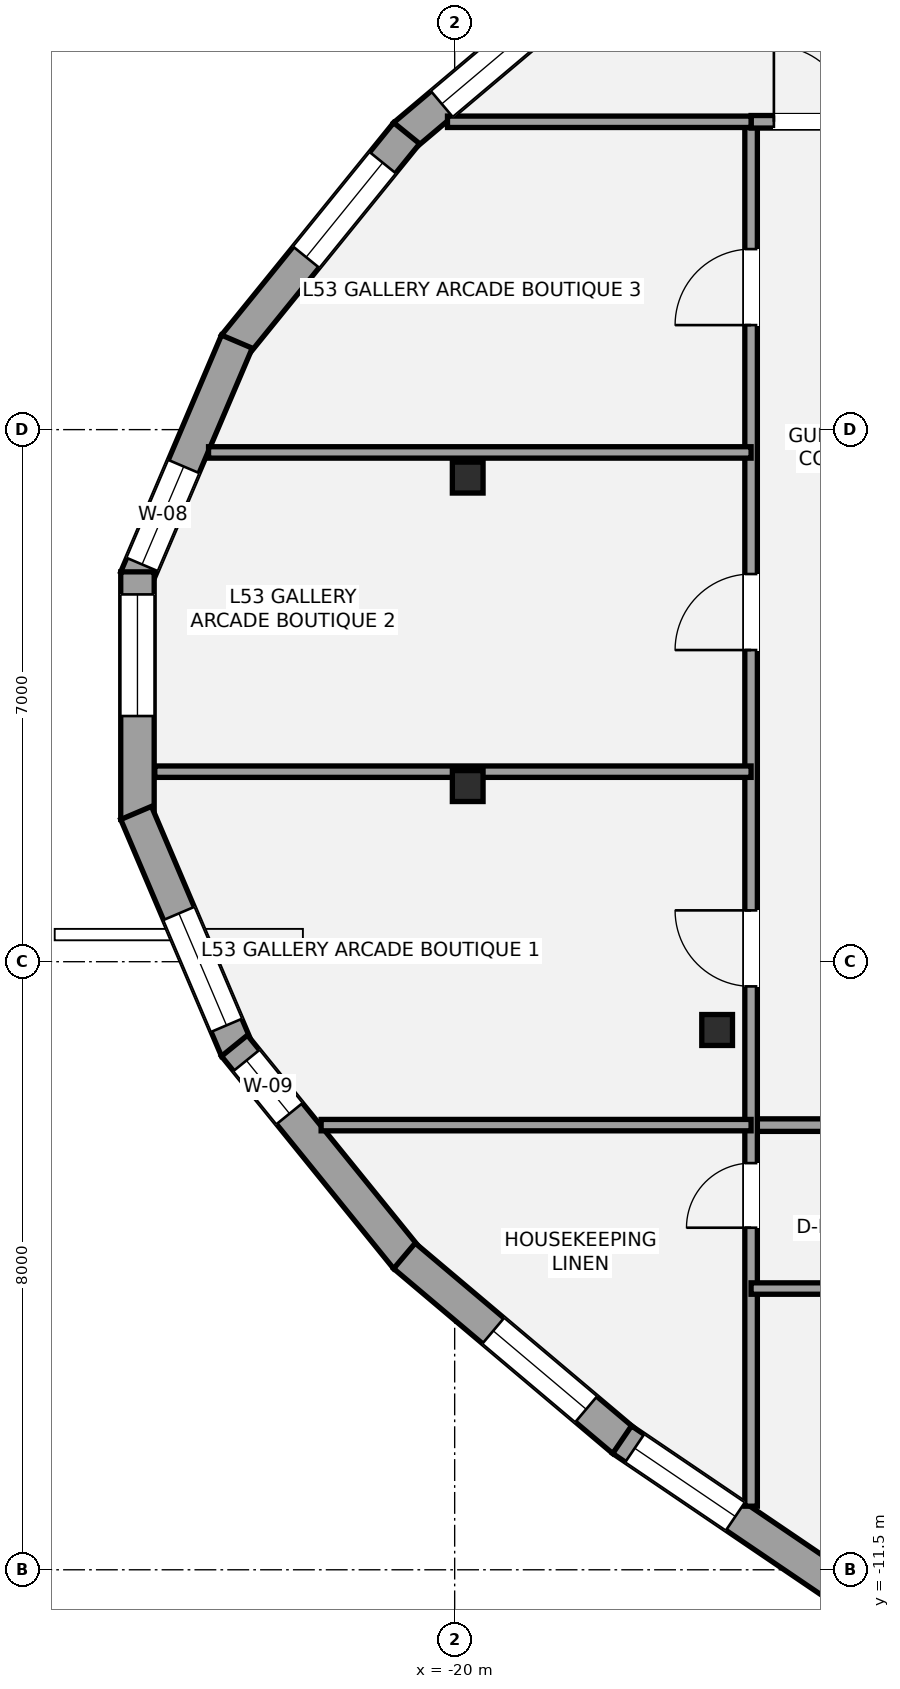
"""IFC4 building model, lengths in metres.
Left out: names, types, materials, properties, quantities, classifications, styles, units other than length and angle.
Written with IfcOpenShell. Run it as: python <this file> out.ifc"""

import sys

from ifc_helpers import new_model, si_unit, direction, frame, frame_2d, origin, origin_2d, place, context, subcontext, project, spatial, rectangle, i_section, extrude, element, fill, save


model = new_model("IFC4")
c1 = context("Model", 3, precision=1e-05, world=origin(), true_north=direction((0.0, 1.0)))
c2 = subcontext(c1, "Body", "Model", "MODEL_VIEW")
j1 = project(units=[si_unit("LENGTHUNIT", "METRE"), si_unit("PLANEANGLEUNIT", "RADIAN")], contexts=[c1])
p1 = place(None, origin())
s1 = spatial("IfcSite", under=j1, at=p1, CompositionType="ELEMENT")
p2 = place(p1, origin())
s2 = spatial("IfcBuilding", under=s1, at=p2, CompositionType="ELEMENT")
p3 = place(p2, frame((0.0, 0.0, 191.8)))
s3 = spatial("IfcBuildingStorey", under=s2, at=p3, CompositionType="ELEMENT", Elevation=191.8)
for number, where, z_axis, x_axis in (
    (1, (-19.828, 2.869, 0.0), (0.0, 0.0, 1.0), (1.0, 0.0, 0.0)),
    (2, (-19.828, -1.189, 0.0), (0.0, 0.0, 1.0), (1.0, 0.0, 0.0)),
    (3, (-16.547, -4.398, 0.0), (0.0, 0.0, 1.0), (1.0, 0.0, 0.0)),
):
    element("IfcColumn", number, at=place(p3, frame(where, z_axis=z_axis, x_axis=x_axis)), inside=s3, PredefinedType="COLUMN", context=c2, shape_type="SweptSolid", body=[
        extrude(i_section(OverallWidth=0.404, OverallDepth=0.407, WebThickness=0.027, FlangeThickness=0.044, at=origin_2d()), origin(), (0.0, 0.0, 1.0), 3.2),
    ])
p4 = place(p3, frame((-20.661, 7.37, 0.0), z_axis=(0.0, 0.0, 1.0), x_axis=(0.764269547527, 0.644896936512, 0.0)))
e4 = element("IfcWall", 4, at=p4, inside=s3, PredefinedType="STANDARD", context=c2, shape_type="SweptSolid", body=[
    extrude(rectangle(XDim=3.771, YDim=0.44, at=frame_2d((1.886, 0.0))), origin(), (0.0, 0.0, 1.0), 2.315),
])
p5 = place(p4, frame((0.643, 0.0, 0.58)))
e5 = element("IfcOpeningElement", 5, at=p5, cuts=e4, PredefinedType="OPENING", context=c2, shape_type="SweptSolid", body=[
    extrude(rectangle(XDim=1.6, YDim=1.55, at=frame_2d((0.8, 0.775))), frame((0.0, 0.23, 0.0), z_axis=(0.0, -1.0, 0.0), x_axis=(1.0, 0.0, 0.0)), (0.0, 0.0, 1.0), 0.46),
])
p6 = place(p3, frame((-22.897, 4.605, 0.0), z_axis=(0.0, 0.0, 1.0), x_axis=(0.629697919329, 0.776840093193, 0.0)))
e6 = element("IfcWall", 6, at=p6, inside=s3, PredefinedType="STANDARD", context=c2, shape_type="SweptSolid", body=[
    extrude(rectangle(XDim=3.597, YDim=0.44, at=frame_2d((1.799, 0.0))), origin(), (0.0, 0.0, 1.0), 2.315),
])
p7 = place(p6, frame((1.498, 0.0, 0.58)))
e7 = element("IfcOpeningElement", 7, at=p7, cuts=e6, PredefinedType="OPENING", context=c2, shape_type="SweptSolid", body=[
    extrude(rectangle(XDim=1.6, YDim=1.55, at=frame_2d((0.8, 0.775))), frame((0.0, 0.23, 0.0), z_axis=(0.0, -1.0, 0.0), x_axis=(1.0, 0.0, 0.0)), (0.0, 0.0, 1.0), 0.46),
])
p8 = place(p3, frame((-24.191, 1.543, 0.0), z_axis=(0.0, 0.0, 1.0), x_axis=(0.391568154721, 0.920149107595, 0.0)))
e8 = element("IfcWall", 8, at=p8, inside=s3, PredefinedType="STANDARD", context=c2, shape_type="SweptSolid", body=[
    extrude(rectangle(XDim=3.385, YDim=0.44, at=frame_2d((1.693, 0.0))), origin(), (0.0, 0.0, 1.0), 2.315),
])
p9 = place(p8, frame((0.2, 0.0, 0.58)))
e9 = element("IfcOpeningElement", 9, at=p9, cuts=e8, PredefinedType="OPENING", context=c2, shape_type="SweptSolid", body=[
    extrude(rectangle(XDim=1.4, YDim=1.55, at=frame_2d((0.7, 0.775))), frame((0.0, 0.23, 0.0), z_axis=(0.0, -1.0, 0.0), x_axis=(1.0, 0.0, 0.0)), (0.0, 0.0, 1.0), 0.46),
])
p10 = place(p3, frame((-24.174, -1.629, 0.0), z_axis=(0.0, 0.0, 1.0), x_axis=(0.0, 1.0, 0.0)))
e10 = element("IfcWall", 10, at=p10, inside=s3, PredefinedType="STANDARD", context=c2, shape_type="SweptSolid", body=[
    extrude(rectangle(XDim=3.258, YDim=0.44, at=frame_2d((1.629, 0.0))), origin(), (0.0, 0.0, 1.0), 2.315),
])
p11 = place(p10, frame((1.361, 0.0, 0.58)))
e11 = element("IfcOpeningElement", 11, at=p11, cuts=e10, PredefinedType="OPENING", context=c2, shape_type="SweptSolid", body=[
    extrude(rectangle(XDim=1.6, YDim=1.55, at=frame_2d((0.8, 0.775))), frame((0.0, 0.23, 0.0), z_axis=(0.0, -1.0, 0.0), x_axis=(1.0, 0.0, 0.0)), (0.0, 0.0, 1.0), 0.46),
])
p12 = place(p3, frame((-22.865, -4.658, 0.0), z_axis=(0.0, 0.0, 1.0), x_axis=(-0.391568154721, 0.920149107595, 0.0)))
e12 = element("IfcWall", 12, at=p12, inside=s3, PredefinedType="STANDARD", context=c2, shape_type="SweptSolid", body=[
    extrude(rectangle(XDim=3.385, YDim=0.44, at=frame_2d((1.693, 0.0))), origin(), (0.0, 0.0, 1.0), 2.315),
])
p13 = place(p12, frame((0.348, 0.0, 0.58)))
e13 = element("IfcOpeningElement", 13, at=p13, cuts=e12, PredefinedType="OPENING", context=c2, shape_type="SweptSolid", body=[
    extrude(rectangle(XDim=1.6, YDim=1.55, at=frame_2d((0.8, 0.775))), frame((0.0, 0.23, 0.0), z_axis=(0.0, -1.0, 0.0), x_axis=(1.0, 0.0, 0.0)), (0.0, 0.0, 1.0), 0.46),
])
p14 = place(p3, frame((-20.632, -7.4, 0.0), z_axis=(0.0, 0.0, 1.0), x_axis=(-0.629697919329, 0.776840093193, 0.0)))
e14 = element("IfcWall", 14, at=p14, inside=s3, PredefinedType="STANDARD", context=c2, shape_type="SweptSolid", body=[
    extrude(rectangle(XDim=3.597, YDim=0.44, at=frame_2d((1.799, 0.0))), origin(), (0.0, 0.0, 1.0), 2.315),
])
p15 = place(p14, frame((2.447, 0.0, 0.58)))
e15 = element("IfcOpeningElement", 15, at=p15, cuts=e14, PredefinedType="OPENING", context=c2, shape_type="SweptSolid", body=[
    extrude(rectangle(XDim=0.9, YDim=1.35, at=frame_2d((0.45, 0.675))), frame((0.0, 0.23, 0.0), z_axis=(0.0, -1.0, 0.0), x_axis=(1.0, 0.0, 0.0)), (0.0, 0.0, 1.0), 0.46),
])
p16 = place(p3, frame((-17.779, -9.802, 0.0), z_axis=(0.0, 0.0, 1.0), x_axis=(-0.764269547527, 0.644896936512, 0.0)))
e16 = element("IfcWall", 16, at=p16, inside=s3, PredefinedType="STANDARD", context=c2, shape_type="SweptSolid", body=[
    extrude(rectangle(XDim=3.771, YDim=0.44, at=frame_2d((1.886, 0.0))), origin(), (0.0, 0.0, 1.0), 2.315),
])
p17 = place(p16, frame((0.643, 0.0, 0.58)))
e17 = element("IfcOpeningElement", 17, at=p17, cuts=e16, PredefinedType="OPENING", context=c2, shape_type="SweptSolid", body=[
    extrude(rectangle(XDim=1.6, YDim=1.55, at=frame_2d((0.8, 0.775))), frame((0.0, 0.23, 0.0), z_axis=(0.0, -1.0, 0.0), x_axis=(1.0, 0.0, 0.0)), (0.0, 0.0, 1.0), 0.46),
])
p18 = place(p3, frame((-14.583, -11.967, 0.0), z_axis=(0.0, 0.0, 1.0), x_axis=(-0.827690675663, 0.561184591218, 0.0)))
e18 = element("IfcWall", 18, at=p18, inside=s3, PredefinedType="STANDARD", context=c2, shape_type="SweptSolid", body=[
    extrude(rectangle(XDim=3.882, YDim=0.44, at=frame_2d((1.941, 0.0))), origin(), (0.0, 0.0, 1.0), 2.315),
])
p19 = place(p18, frame((2.083, 0.0, 0.58)))
e19 = element("IfcOpeningElement", 19, at=p19, cuts=e18, PredefinedType="OPENING", context=c2, shape_type="SweptSolid", body=[
    extrude(rectangle(XDim=1.6, YDim=1.55, at=frame_2d((0.8, 0.775))), frame((0.0, 0.23, 0.0), z_axis=(0.0, -1.0, 0.0), x_axis=(1.0, 0.0, 0.0)), (0.0, 0.0, 1.0), 0.46),
])
p20 = place(p3, frame((-16.1, -5.65, 0.0), z_axis=(0.0, 0.0, 1.0), x_axis=(1.0, 0.0, 0.0)))
e20 = element("IfcWall", 20, at=p20, inside=s3, PredefinedType="PARTITIONING", context=c2, shape_type="SweptSolid", body=[
    extrude(rectangle(XDim=31.65, YDim=0.165, at=frame_2d((15.825, 0.0))), origin(), (0.0, 0.0, 1.0), 2.398),
])
p21 = place(p20, frame((8.95, 0.0, 0.0)))
e21 = element("IfcOpeningElement", 21, at=p21, cuts=e20, PredefinedType="OPENING", context=c2, shape_type="SweptSolid", body=[
    extrude(rectangle(XDim=0.95, YDim=2.15, at=frame_2d((0.475, 1.075))), frame((0.0, 0.093, 0.0), z_axis=(0.0, -1.0, 0.0), x_axis=(1.0, 0.0, 0.0)), (0.0, 0.0, 1.0), 0.185),
])
p22 = place(p20, frame((18.95, 0.0, 0.0)))
e22 = element("IfcOpeningElement", 22, at=p22, cuts=e20, PredefinedType="OPENING", context=c2, shape_type="SweptSolid", body=[
    extrude(rectangle(XDim=0.95, YDim=2.15, at=frame_2d((0.475, 1.075))), frame((0.0, 0.093, 0.0), z_axis=(0.0, -1.0, 0.0), x_axis=(1.0, 0.0, 0.0)), (0.0, 0.0, 1.0), 0.185),
])
p23 = place(p20, frame((30.3, 0.0, 0.0)))
e23 = element("IfcOpeningElement", 23, at=p23, cuts=e20, PredefinedType="OPENING", context=c2, shape_type="SweptSolid", body=[
    extrude(rectangle(XDim=0.95, YDim=2.15, at=frame_2d((0.475, 1.075))), frame((0.0, 0.093, 0.0), z_axis=(0.0, -1.0, 0.0), x_axis=(1.0, 0.0, 0.0)), (0.0, 0.0, 1.0), 0.185),
])
p24 = place(p3, frame((-16.1, -10.663, 0.0), z_axis=(0.0, 0.0, 1.0), x_axis=(0.0, 1.0, 0.0)))
e24 = element("IfcWall", 24, at=p24, inside=s3, PredefinedType="PARTITIONING", context=c2, shape_type="SweptSolid", body=[
    extrude(rectangle(XDim=18.213, YDim=0.165, at=frame_2d((9.107, 0.0))), origin(), (0.0, 0.0, 1.0), 2.473),
])
p25 = place(p24, frame((3.664, 0.0, 0.0)))
e25 = element("IfcOpeningElement", 25, at=p25, cuts=e24, PredefinedType="OPENING", context=c2, shape_type="SweptSolid", body=[
    extrude(rectangle(XDim=0.85, YDim=2.1, at=frame_2d((0.425, 1.05))), frame((0.0, 0.093, 0.0), z_axis=(0.0, -1.0, 0.0), x_axis=(1.0, 0.0, 0.0)), (0.0, 0.0, 1.0), 0.185),
])
p26 = place(p24, frame((6.839, 0.0, 0.0)))
e26 = element("IfcOpeningElement", 26, at=p26, cuts=e24, PredefinedType="OPENING", context=c2, shape_type="SweptSolid", body=[
    extrude(rectangle(XDim=1.0, YDim=2.15, at=frame_2d((0.5, 1.075))), frame((0.0, 0.093, 0.0), z_axis=(0.0, -1.0, 0.0), x_axis=(1.0, 0.0, 0.0)), (0.0, 0.0, 1.0), 0.185),
])
p27 = place(p24, frame((11.264, 0.0, 0.0)))
e27 = element("IfcOpeningElement", 27, at=p27, cuts=e24, PredefinedType="OPENING", context=c2, shape_type="SweptSolid", body=[
    extrude(rectangle(XDim=1.0, YDim=2.15, at=frame_2d((0.5, 1.075))), frame((0.0, 0.093, 0.0), z_axis=(0.0, -1.0, 0.0), x_axis=(1.0, 0.0, 0.0)), (0.0, 0.0, 1.0), 0.185),
])
p28 = place(p24, frame((15.539, 0.0, 0.0)))
e28 = element("IfcOpeningElement", 28, at=p28, cuts=e24, PredefinedType="OPENING", context=c2, shape_type="SweptSolid", body=[
    extrude(rectangle(XDim=1.0, YDim=2.15, at=frame_2d((0.5, 1.075))), frame((0.0, 0.093, 0.0), z_axis=(0.0, -1.0, 0.0), x_axis=(1.0, 0.0, 0.0)), (0.0, 0.0, 1.0), 0.185),
])
p29 = place(p3, frame((-16.1, 7.55, 0.0), z_axis=(0.0, 0.0, 1.0), x_axis=(1.0, 0.0, 0.0)))
e29 = element("IfcWall", 29, at=p29, inside=s3, PredefinedType="PARTITIONING", context=c2, shape_type="SweptSolid", body=[
    extrude(rectangle(XDim=2.3, YDim=0.165, at=frame_2d((1.15, 0.0))), origin(), (0.0, 0.0, 1.0), 3.02),
])
p30 = place(p29, frame((0.3, 0.0, 0.0)))
e30 = element("IfcOpeningElement", 30, at=p30, cuts=e29, PredefinedType="OPENING", context=c2, shape_type="SweptSolid", body=[
    extrude(rectangle(XDim=1.0, YDim=2.15, at=frame_2d((0.5, 1.075))), frame((0.0, 0.093, 0.0), z_axis=(0.0, -1.0, 0.0), x_axis=(1.0, 0.0, 0.0)), (0.0, 0.0, 1.0), 0.185),
])
p31 = place(p3, frame((-20.094, 7.55, 0.0), z_axis=(0.0, 0.0, 1.0), x_axis=(1.0, 0.0, 0.0)))
e31 = element("IfcWall", 31, at=p31, inside=s3, PredefinedType="PLUMBINGWALL", context=c2, shape_type="SweptSolid", body=[
    extrude(rectangle(XDim=3.994, YDim=0.15, at=frame_2d((1.997, 0.0))), origin(), (0.0, 0.0, 1.0), 2.473),
])
p32 = place(p3, frame((-21.757, -5.65, 0.0), z_axis=(0.0, 0.0, 1.0), x_axis=(1.0, 0.0, 0.0)))
e32 = element("IfcWall", 32, at=p32, inside=s3, PredefinedType="PLUMBINGWALL", context=c2, shape_type="SweptSolid", body=[
    extrude(rectangle(XDim=5.657, YDim=0.15, at=frame_2d((2.828, 0.0))), origin(), (0.0, 0.0, 1.0), 2.473),
])
p33 = place(p3, frame((-16.1, -7.8, 0.0), z_axis=(0.0, 0.0, 1.0), x_axis=(1.0, 0.0, 0.0)))
e33 = element("IfcWall", 33, at=p33, inside=s3, PredefinedType="PLUMBINGWALL", context=c2, shape_type="SweptSolid", body=[
    extrude(rectangle(XDim=1.85, YDim=0.15, at=frame_2d((0.925, 0.0))), origin(), (0.0, 0.0, 1.0), 2.473),
])
p34 = place(p3, frame((-23.946, -1.0, 0.0), z_axis=(0.0, 0.0, 1.0), x_axis=(1.0, 0.0, 0.0)))
e34 = element("IfcWall", 34, at=p34, inside=s3, PredefinedType="PLUMBINGWALL", context=c2, shape_type="SweptSolid", body=[
    extrude(rectangle(XDim=7.845, YDim=0.15, at=frame_2d((3.923, 0.0))), origin(), (0.0, 0.0, 1.0), 2.473),
])
p35 = place(p3, frame((-23.238, 3.2, 0.0), z_axis=(0.0, 0.0, 1.0), x_axis=(1.0, 0.0, 0.0)))
e35 = element("IfcWall", 35, at=p35, inside=s3, PredefinedType="PLUMBINGWALL", context=c2, shape_type="SweptSolid", body=[
    extrude(rectangle(XDim=7.138, YDim=0.15, at=frame_2d((3.569, 0.0))), origin(), (0.0, 0.0, 1.0), 2.473),
])
p36 = place(p5, origin())
e36 = element("IfcWindow", 36, at=p36, inside=s3, PartitioningType="SINGLE_PANEL", PredefinedType="WINDOW", context=c2, shape_type="SweptSolid", body=[
    extrude(rectangle(XDim=1.6, YDim=1.55, at=frame_2d((0.8, 0.775))), frame((0.0, -0.01, 0.0), z_axis=(0.0, -1.0, 0.0), x_axis=(1.0, 0.0, 0.0)), (0.0, 0.0, 1.0), 0.06),
])
fill(e5, e36)
p37 = place(p7, origin())
e37 = element("IfcWindow", 37, at=p37, inside=s3, PartitioningType="SINGLE_PANEL", PredefinedType="WINDOW", context=c2, shape_type="SweptSolid", body=[
    extrude(rectangle(XDim=1.6, YDim=1.55, at=frame_2d((0.8, 0.775))), frame((0.0, -0.01, 0.0), z_axis=(0.0, -1.0, 0.0), x_axis=(1.0, 0.0, 0.0)), (0.0, 0.0, 1.0), 0.06),
])
fill(e7, e37)
p38 = place(p9, origin())
e38 = element("IfcWindow", 38, at=p38, inside=s3, PartitioningType="SINGLE_PANEL", PredefinedType="WINDOW", context=c2, shape_type="SweptSolid", body=[
    extrude(rectangle(XDim=1.4, YDim=1.55, at=frame_2d((0.7, 0.775))), frame((0.0, -0.01, 0.0), z_axis=(0.0, -1.0, 0.0), x_axis=(1.0, 0.0, 0.0)), (0.0, 0.0, 1.0), 0.06),
])
fill(e9, e38)
p39 = place(p11, origin())
e39 = element("IfcWindow", 39, at=p39, inside=s3, PartitioningType="SINGLE_PANEL", PredefinedType="WINDOW", context=c2, shape_type="SweptSolid", body=[
    extrude(rectangle(XDim=1.6, YDim=1.55, at=frame_2d((0.8, 0.775))), frame((0.0, -0.01, 0.0), z_axis=(0.0, -1.0, 0.0), x_axis=(1.0, 0.0, 0.0)), (0.0, 0.0, 1.0), 0.06),
])
fill(e11, e39)
p40 = place(p13, origin())
e40 = element("IfcWindow", 40, at=p40, inside=s3, PartitioningType="SINGLE_PANEL", PredefinedType="WINDOW", context=c2, shape_type="SweptSolid", body=[
    extrude(rectangle(XDim=1.6, YDim=1.55, at=frame_2d((0.8, 0.775))), frame((0.0, -0.01, 0.0), z_axis=(0.0, -1.0, 0.0), x_axis=(1.0, 0.0, 0.0)), (0.0, 0.0, 1.0), 0.06),
])
fill(e13, e40)
p41 = place(p15, origin())
e41 = element("IfcWindow", 41, at=p41, inside=s3, PartitioningType="SINGLE_PANEL", PredefinedType="WINDOW", context=c2, shape_type="SweptSolid", body=[
    extrude(rectangle(XDim=0.9, YDim=1.35, at=frame_2d((0.45, 0.675))), frame((0.0, -0.01, 0.0), z_axis=(0.0, -1.0, 0.0), x_axis=(1.0, 0.0, 0.0)), (0.0, 0.0, 1.0), 0.06),
])
fill(e15, e41)
p42 = place(p17, origin())
e42 = element("IfcWindow", 42, at=p42, inside=s3, PartitioningType="SINGLE_PANEL", PredefinedType="WINDOW", context=c2, shape_type="SweptSolid", body=[
    extrude(rectangle(XDim=1.6, YDim=1.55, at=frame_2d((0.8, 0.775))), frame((0.0, -0.01, 0.0), z_axis=(0.0, -1.0, 0.0), x_axis=(1.0, 0.0, 0.0)), (0.0, 0.0, 1.0), 0.06),
])
fill(e17, e42)
p43 = place(p19, origin())
e43 = element("IfcWindow", 43, at=p43, inside=s3, PartitioningType="SINGLE_PANEL", PredefinedType="WINDOW", context=c2, shape_type="SweptSolid", body=[
    extrude(rectangle(XDim=1.6, YDim=1.55, at=frame_2d((0.8, 0.775))), frame((0.0, -0.01, 0.0), z_axis=(0.0, -1.0, 0.0), x_axis=(1.0, 0.0, 0.0)), (0.0, 0.0, 1.0), 0.06),
])
fill(e19, e43)
p44 = place(p30, origin())
e44 = element("IfcDoor", 44, at=p44, inside=s3, OperationType="SINGLE_SWING_LEFT", PredefinedType="DOOR", context=c2, shape_type="SweptSolid", body=[
    extrude(rectangle(XDim=1.0, YDim=2.15, at=frame_2d((0.5, 1.075))), frame((0.0, 0.025, 0.0), z_axis=(0.0, -1.0, 0.0), x_axis=(1.0, 0.0, 0.0)), (0.0, 0.0, 1.0), 0.05),
])
fill(e30, e44)
p45 = place(p25, origin())
e45 = element("IfcDoor", 45, at=p45, inside=s3, OperationType="SINGLE_SWING_LEFT", PredefinedType="DOOR", context=c2, shape_type="SweptSolid", body=[
    extrude(rectangle(XDim=0.85, YDim=2.1, at=frame_2d((0.425, 1.05))), frame((0.0, 0.025, 0.0), z_axis=(0.0, -1.0, 0.0), x_axis=(1.0, 0.0, 0.0)), (0.0, 0.0, 1.0), 0.05),
])
fill(e25, e45)
p46 = place(p26, origin())
e46 = element("IfcDoor", 46, at=p46, inside=s3, OperationType="SINGLE_SWING_RIGHT", PredefinedType="DOOR", context=c2, shape_type="SweptSolid", body=[
    extrude(rectangle(XDim=1.0, YDim=2.15, at=frame_2d((0.5, 1.075))), frame((0.0, 0.025, 0.0), z_axis=(0.0, -1.0, 0.0), x_axis=(1.0, 0.0, 0.0)), (0.0, 0.0, 1.0), 0.05),
])
fill(e26, e46)
p47 = place(p27, origin())
e47 = element("IfcDoor", 47, at=p47, inside=s3, OperationType="SINGLE_SWING_LEFT", PredefinedType="DOOR", context=c2, shape_type="SweptSolid", body=[
    extrude(rectangle(XDim=1.0, YDim=2.15, at=frame_2d((0.5, 1.075))), frame((0.0, 0.025, 0.0), z_axis=(0.0, -1.0, 0.0), x_axis=(1.0, 0.0, 0.0)), (0.0, 0.0, 1.0), 0.05),
])
fill(e27, e47)
p48 = place(p28, origin())
e48 = element("IfcDoor", 48, at=p48, inside=s3, OperationType="SINGLE_SWING_LEFT", PredefinedType="DOOR", context=c2, shape_type="SweptSolid", body=[
    extrude(rectangle(XDim=1.0, YDim=2.15, at=frame_2d((0.5, 1.075))), frame((0.0, 0.025, 0.0), z_axis=(0.0, -1.0, 0.0), x_axis=(1.0, 0.0, 0.0)), (0.0, 0.0, 1.0), 0.05),
])
fill(e28, e48)
save(model, sys.argv[1])
